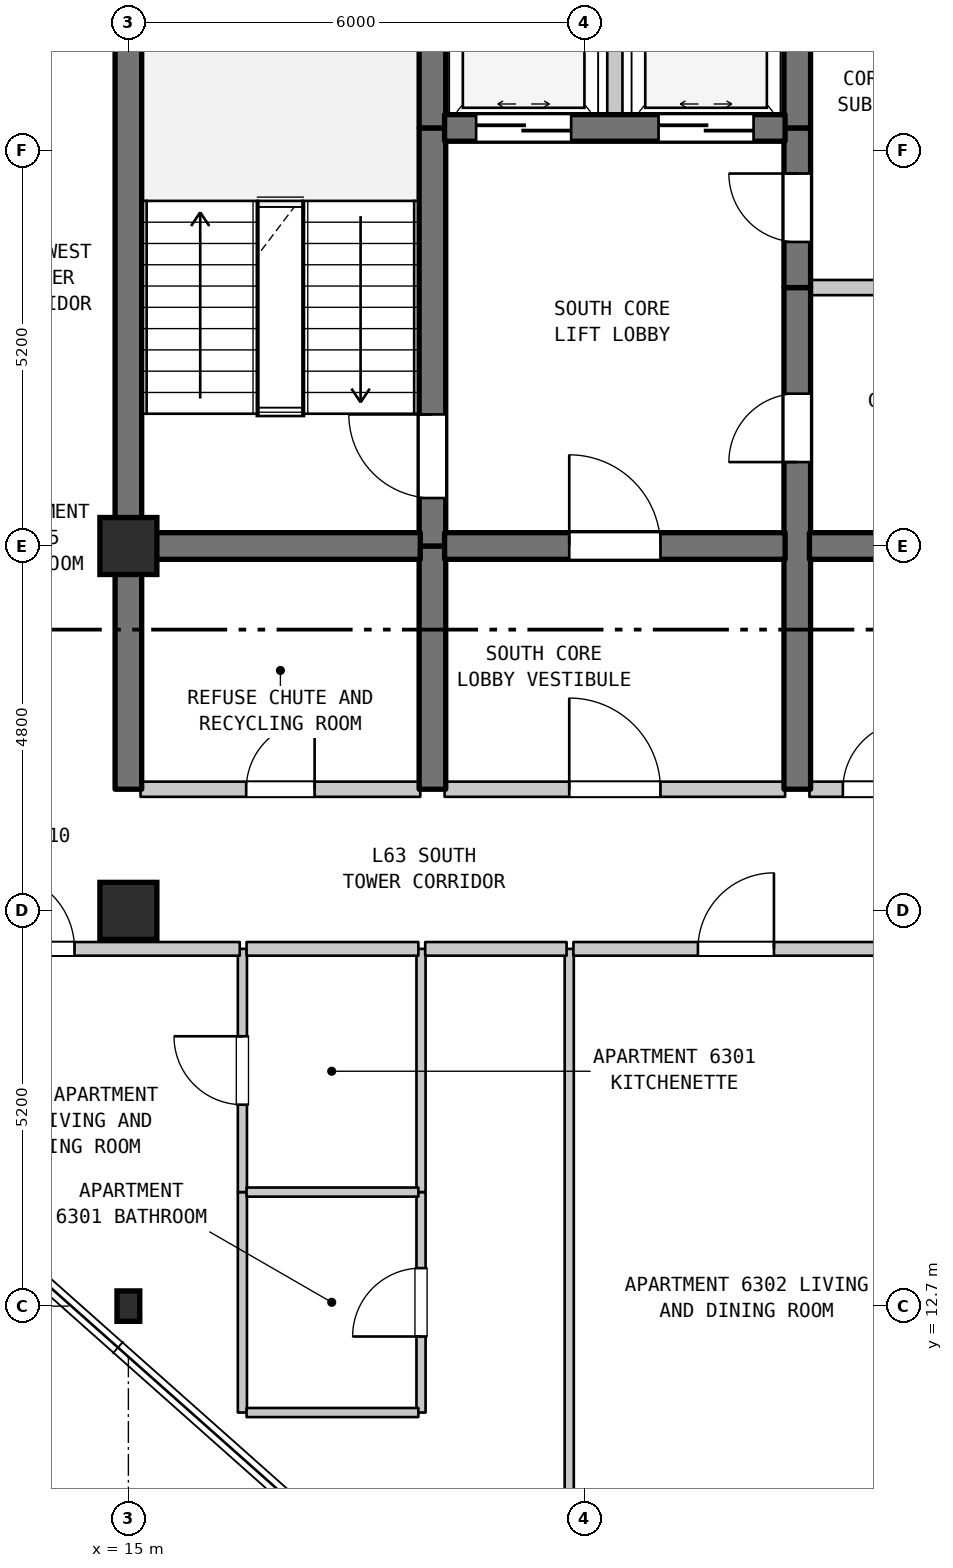
"""IFC4 building model, lengths in metres.
Left out: names, types, materials, properties, quantities, classifications, styles, units other than length and angle.
Written with IfcOpenShell. Run it as: python <this file> out.ifc"""

import sys

from ifc_helpers import new_model, si_unit, direction, frame, frame_2d, origin, origin_2d, place, context, subcontext, project, spatial, rectangle, i_section, extrude, element, fill, save


model = new_model("IFC4")
c1 = context("Model", 3, precision=1e-05, world=origin(), true_north=direction((0.0, 1.0)))
c2 = subcontext(c1, "Body", "Model", "MODEL_VIEW")
j1 = project(units=[si_unit("LENGTHUNIT", "METRE"), si_unit("PLANEANGLEUNIT", "RADIAN")], contexts=[c1])
p1 = place(None, origin())
s1 = spatial("IfcSite", under=j1, at=p1, CompositionType="ELEMENT")
p2 = place(p1, origin())
s2 = spatial("IfcBuilding", under=s1, at=p2, CompositionType="ELEMENT")
p3 = place(p2, frame((0.0, 0.0, 254.7)))
s3 = spatial("IfcBuildingStorey", under=s2, at=p3, CompositionType="ELEMENT", Elevation=254.7)
p4 = place(p3, frame((15.0, 12.7, 0.0), z_axis=(0.0, 0.0, 1.0), x_axis=(1.0, 0.0, 0.0)))
e1 = element("IfcColumn", 1, at=p4, inside=s3, PredefinedType="COLUMN", context=c2, shape_type="SweptSolid", body=[
    extrude(i_section(OverallWidth=0.3, OverallDepth=0.4, WebThickness=0.013, FlangeThickness=0.024, FilletRadius=0.027, at=origin_2d()), origin(), (0.0, 0.0, 1.0), 3.7),
])
for number, where, z_axis, x_axis in (
    (2, (15.0, 17.9, 0.0), (0.0, 0.0, 1.0), (1.0, 0.0, 0.0)),
    (3, (15.0, 22.7, 0.0), (0.0, 0.0, 1.0), (1.0, 0.0, 0.0)),
):
    element("IfcColumn", number, at=place(p3, frame(where, z_axis=z_axis, x_axis=x_axis)), inside=s3, PredefinedType="COLUMN", context=c2, shape_type="SweptSolid", body=[
        extrude(rectangle(XDim=0.75, YDim=0.75, at=origin_2d()), origin(), (0.0, 0.0, 1.0), 3.7),
    ])
p5 = place(p3, frame((15.0, 19.5, 0.0), z_axis=(0.0, 0.0, 1.0), x_axis=(0.0, 1.0, 0.0)))
e4 = element("IfcWall", 4, at=p5, inside=s3, PredefinedType="SHEAR", context=c2, shape_type="SweptSolid", body=[
    extrude(rectangle(XDim=3.2, YDim=0.35, at=frame_2d((1.6, 0.0))), origin(), (0.0, 0.0, 1.0), 3.39),
])
p6 = place(p3, frame((15.0, 22.7, 0.0), z_axis=(0.0, 0.0, 1.0), x_axis=(0.0, 1.0, 0.0)))
e5 = element("IfcWall", 5, at=p6, inside=s3, PredefinedType="SHEAR", context=c2, shape_type="SweptSolid", body=[
    extrude(rectangle(XDim=6.8, YDim=0.35, at=frame_2d((3.4, 0.0))), origin(), (0.0, 0.0, 1.0), 3.39),
])
p7 = place(p3, frame((16.5, 11.3, 0.0), z_axis=(0.0, 0.0, 1.0), x_axis=(0.0, 1.0, 0.0)))
e6 = element("IfcWall", 6, at=p7, inside=s3, PredefinedType="PARTITIONING", context=c2, shape_type="SweptSolid", body=[
    extrude(rectangle(XDim=2.9, YDim=0.12, at=frame_2d((1.45, 0.0))), origin(), (0.0, 0.0, 1.0), 3.39),
])
p8 = place(p3, frame((16.5, 14.2, 0.0), z_axis=(0.0, 0.0, 1.0), x_axis=(0.0, 1.0, 0.0)))
e7 = element("IfcWall", 7, at=p8, inside=s3, PredefinedType="PARTITIONING", context=c2, shape_type="SweptSolid", body=[
    extrude(rectangle(XDim=3.2, YDim=0.12, at=frame_2d((1.6, 0.0))), origin(), (0.0, 0.0, 1.0), 3.39),
])
p9 = place(p8, frame((1.15, 0.0, 0.0)))
e8 = element("IfcOpeningElement", 8, at=p9, cuts=e7, PredefinedType="OPENING", context=c2, shape_type="SweptSolid", body=[
    extrude(rectangle(XDim=0.9, YDim=2.15, at=frame_2d((0.45, 1.075))), frame((0.0, 0.07, 0.0), z_axis=(0.0, -1.0, 0.0), x_axis=(1.0, 0.0, 0.0)), (0.0, 0.0, 1.0), 0.14),
])
p10 = place(p3, frame((18.85, 11.3, 0.0), z_axis=(0.0, 0.0, 1.0), x_axis=(0.0, 1.0, 0.0)))
e9 = element("IfcWall", 9, at=p10, inside=s3, PredefinedType="PARTITIONING", context=c2, shape_type="SweptSolid", body=[
    extrude(rectangle(XDim=2.9, YDim=0.12, at=frame_2d((1.45, 0.0))), origin(), (0.0, 0.0, 1.0), 3.39),
])
p11 = place(p10, frame((1.0, 0.0, 0.0)))
e10 = element("IfcOpeningElement", 10, at=p11, cuts=e9, PredefinedType="OPENING", context=c2, shape_type="SweptSolid", body=[
    extrude(rectangle(XDim=0.9, YDim=2.1, at=frame_2d((0.45, 1.05))), frame((0.0, 0.07, 0.0), z_axis=(0.0, -1.0, 0.0), x_axis=(1.0, 0.0, 0.0)), (0.0, 0.0, 1.0), 0.14),
])
p12 = place(p3, frame((18.85, 14.2, 0.0), z_axis=(0.0, 0.0, 1.0), x_axis=(0.0, 1.0, 0.0)))
e11 = element("IfcWall", 11, at=p12, inside=s3, PredefinedType="PARTITIONING", context=c2, shape_type="SweptSolid", body=[
    extrude(rectangle(XDim=3.2, YDim=0.12, at=frame_2d((1.6, 0.0))), origin(), (0.0, 0.0, 1.0), 3.39),
])
p13 = place(p3, frame((19.0, 19.5, 0.0), z_axis=(0.0, 0.0, 1.0), x_axis=(0.0, 1.0, 0.0)))
e12 = element("IfcWall", 12, at=p13, inside=s3, PredefinedType="SHEAR", context=c2, shape_type="SweptSolid", body=[
    extrude(rectangle(XDim=3.2, YDim=0.35, at=frame_2d((1.6, 0.0))), origin(), (0.0, 0.0, 1.0), 3.39),
])
p14 = place(p3, frame((19.0, 22.7, 0.0), z_axis=(0.0, 0.0, 1.0), x_axis=(0.0, 1.0, 0.0)))
e13 = element("IfcWall", 13, at=p14, inside=s3, PredefinedType="SHEAR", context=c2, shape_type="SweptSolid", body=[
    extrude(rectangle(XDim=5.5, YDim=0.35, at=frame_2d((2.75, 0.0))), origin(), (0.0, 0.0, 1.0), 3.39),
])
p15 = place(p14, frame((0.631, 0.0, 0.0)))
e14 = element("IfcOpeningElement", 14, at=p15, cuts=e13, PredefinedType="OPENING", context=c2, shape_type="SweptSolid", body=[
    extrude(rectangle(XDim=1.1, YDim=2.15, at=frame_2d((0.55, 1.075))), frame((0.0, 0.185, 0.0), z_axis=(0.0, -1.0, 0.0), x_axis=(1.0, 0.0, 0.0)), (0.0, 0.0, 1.0), 0.37),
])
p16 = place(p3, frame((19.0, 28.2, 0.0), z_axis=(0.0, 0.0, 1.0), x_axis=(0.0, 1.0, 0.0)))
e15 = element("IfcWall", 15, at=p16, inside=s3, PredefinedType="SHEAR", context=c2, shape_type="SweptSolid", body=[
    extrude(rectangle(XDim=1.3, YDim=0.35, at=frame_2d((0.65, 0.0))), origin(), (0.0, 0.0, 1.0), 3.39),
])
p17 = place(p3, frame((20.8, 7.075, 0.0), z_axis=(0.0, 0.0, 1.0), x_axis=(0.0, 1.0, 0.0)))
e16 = element("IfcWall", 16, at=p17, inside=s3, PredefinedType="PARTITIONING", context=c2, shape_type="SweptSolid", body=[
    extrude(rectangle(XDim=10.325, YDim=0.12, at=frame_2d((5.163, 0.0))), origin(), (0.0, 0.0, 1.0), 3.39),
])
p18 = place(p3, frame((21.4, 28.2, 0.0), z_axis=(0.0, 0.0, 1.0), x_axis=(0.0, 1.0, 0.0)))
e17 = element("IfcWall", 17, at=p18, inside=s3, PredefinedType="STANDARD", context=c2, shape_type="SweptSolid", body=[
    extrude(rectangle(XDim=2.6, YDim=0.2, at=frame_2d((1.3, 0.0))), origin(), (0.0, 0.0, 1.0), 3.39),
])
p19 = place(p3, frame((23.8, 19.5, 0.0), z_axis=(0.0, 0.0, 1.0), x_axis=(0.0, 1.0, 0.0)))
e18 = element("IfcWall", 18, at=p19, inside=s3, PredefinedType="SHEAR", context=c2, shape_type="SweptSolid", body=[
    extrude(rectangle(XDim=6.6, YDim=0.35, at=frame_2d((3.3, 0.0))), origin(), (0.0, 0.0, 1.0), 3.39),
])
p20 = place(p19, frame((4.304, 0.0, 0.0)))
e19 = element("IfcOpeningElement", 19, at=p20, cuts=e18, PredefinedType="OPENING", context=c2, shape_type="SweptSolid", body=[
    extrude(rectangle(XDim=0.9, YDim=2.15, at=frame_2d((0.45, 1.075))), frame((0.0, 0.185, 0.0), z_axis=(0.0, -1.0, 0.0), x_axis=(1.0, 0.0, 0.0)), (0.0, 0.0, 1.0), 0.37),
])
p21 = place(p3, frame((23.8, 26.1, 0.0), z_axis=(0.0, 0.0, 1.0), x_axis=(0.0, 1.0, 0.0)))
e20 = element("IfcWall", 20, at=p21, inside=s3, PredefinedType="SHEAR", context=c2, shape_type="SweptSolid", body=[
    extrude(rectangle(XDim=2.1, YDim=0.35, at=frame_2d((1.05, 0.0))), origin(), (0.0, 0.0, 1.0), 3.39),
])
p22 = place(p21, frame((0.6, 0.0, 0.0)))
e21 = element("IfcOpeningElement", 21, at=p22, cuts=e20, PredefinedType="OPENING", context=c2, shape_type="SweptSolid", body=[
    extrude(rectangle(XDim=0.9, YDim=2.15, at=frame_2d((0.45, 1.075))), frame((0.0, 0.185, 0.0), z_axis=(0.0, -1.0, 0.0), x_axis=(1.0, 0.0, 0.0)), (0.0, 0.0, 1.0), 0.37),
])
p23 = place(p3, frame((23.8, 28.2, 0.0), z_axis=(0.0, 0.0, 1.0), x_axis=(0.0, 1.0, 0.0)))
e22 = element("IfcWall", 22, at=p23, inside=s3, PredefinedType="SHEAR", context=c2, shape_type="SweptSolid", body=[
    extrude(rectangle(XDim=2.6, YDim=0.35, at=frame_2d((1.3, 0.0))), origin(), (0.0, 0.0, 1.0), 3.39),
])
for number, where, z_axis, x_axis in (
    (23, (16.555, 11.3, 0.0), (0.0, 0.0, 1.0), (1.0, 0.0, 0.0)),
    (24, (16.555, 14.2, 0.0), (0.0, 0.0, 1.0), (1.0, 0.0, 0.0)),
):
    element("IfcWall", number, at=place(p3, frame(where, z_axis=z_axis, x_axis=x_axis)), inside=s3, PredefinedType="PARTITIONING", context=c2, shape_type="SweptSolid", body=[
        extrude(rectangle(XDim=2.26, YDim=0.12, at=frame_2d((1.13, 0.0))), origin(), (0.0, 0.0, 1.0), 3.39),
    ])
p24 = place(p3, frame((12.975, 17.4, 0.0), z_axis=(0.0, 0.0, 1.0), x_axis=(1.0, 0.0, 0.0)))
e25 = element("IfcWall", 25, at=p24, inside=s3, PredefinedType="STANDARD", context=c2, shape_type="SweptSolid", body=[
    extrude(rectangle(XDim=3.49, YDim=0.18, at=frame_2d((1.745, 0.0))), origin(), (0.0, 0.0, 1.0), 3.39),
])
p25 = place(p24, frame((0.316, 0.0, 0.0)))
e26 = element("IfcOpeningElement", 26, at=p25, cuts=e25, PredefinedType="OPENING", context=c2, shape_type="SweptSolid", body=[
    extrude(rectangle(XDim=1.0, YDim=2.15, at=frame_2d((0.5, 1.075))), frame((0.0, 0.1, 0.0), z_axis=(0.0, -1.0, 0.0), x_axis=(1.0, 0.0, 0.0)), (0.0, 0.0, 1.0), 0.2),
])
p26 = place(p3, frame((16.555, 17.4, 0.0), z_axis=(0.0, 0.0, 1.0), x_axis=(1.0, 0.0, 0.0)))
e27 = element("IfcWall", 27, at=p26, inside=s3, PredefinedType="STANDARD", context=c2, shape_type="SweptSolid", body=[
    extrude(rectangle(XDim=2.26, YDim=0.18, at=frame_2d((1.13, 0.0))), origin(), (0.0, 0.0, 1.0), 3.39),
])
p27 = place(p3, frame((18.905, 17.4, 0.0), z_axis=(0.0, 0.0, 1.0), x_axis=(1.0, 0.0, 0.0)))
e28 = element("IfcWall", 28, at=p27, inside=s3, PredefinedType="STANDARD", context=c2, shape_type="SweptSolid", body=[
    extrude(rectangle(XDim=1.86, YDim=0.18, at=frame_2d((0.93, 0.0))), origin(), (0.0, 0.0, 1.0), 3.39),
])
p28 = place(p3, frame((20.855, 17.4, 0.0), z_axis=(0.0, 0.0, 1.0), x_axis=(1.0, 0.0, 0.0)))
e29 = element("IfcWall", 29, at=p28, inside=s3, PredefinedType="STANDARD", context=c2, shape_type="SweptSolid", body=[
    extrude(rectangle(XDim=4.42, YDim=0.18, at=frame_2d((2.21, 0.0))), origin(), (0.0, 0.0, 1.0), 3.39),
])
p29 = place(p28, frame((1.638, 0.0, 0.0)))
e30 = element("IfcOpeningElement", 30, at=p29, cuts=e29, PredefinedType="OPENING", context=c2, shape_type="SweptSolid", body=[
    extrude(rectangle(XDim=1.0, YDim=2.15, at=frame_2d((0.5, 1.075))), frame((0.0, 0.1, 0.0), z_axis=(0.0, -1.0, 0.0), x_axis=(1.0, 0.0, 0.0)), (0.0, 0.0, 1.0), 0.2),
])
p30 = place(p3, frame((15.16, 19.5, 0.0), z_axis=(0.0, 0.0, 1.0), x_axis=(1.0, 0.0, 0.0)))
e31 = element("IfcWall", 31, at=p30, inside=s3, PredefinedType="STANDARD", context=c2, shape_type="SweptSolid", body=[
    extrude(rectangle(XDim=3.68, YDim=0.2, at=frame_2d((1.84, 0.0))), origin(), (0.0, 0.0, 1.0), 3.39),
])
p31 = place(p30, frame((1.39, 0.0, 0.0)))
e32 = element("IfcOpeningElement", 32, at=p31, cuts=e31, PredefinedType="OPENING", context=c2, shape_type="SweptSolid", body=[
    extrude(rectangle(XDim=0.9, YDim=2.15, at=frame_2d((0.45, 1.075))), frame((0.0, 0.11, 0.0), z_axis=(0.0, -1.0, 0.0), x_axis=(1.0, 0.0, 0.0)), (0.0, 0.0, 1.0), 0.22),
])
p32 = place(p3, frame((19.16, 19.5, 0.0), z_axis=(0.0, 0.0, 1.0), x_axis=(1.0, 0.0, 0.0)))
e33 = element("IfcWall", 33, at=p32, inside=s3, PredefinedType="STANDARD", context=c2, shape_type="SweptSolid", body=[
    extrude(rectangle(XDim=4.48, YDim=0.2, at=frame_2d((2.24, 0.0))), origin(), (0.0, 0.0, 1.0), 3.39),
])
p33 = place(p32, frame((1.64, 0.0, 0.0)))
e34 = element("IfcOpeningElement", 34, at=p33, cuts=e33, PredefinedType="OPENING", context=c2, shape_type="SweptSolid", body=[
    extrude(rectangle(XDim=1.2, YDim=2.2, at=frame_2d((0.6, 1.1))), frame((0.0, 0.11, 0.0), z_axis=(0.0, -1.0, 0.0), x_axis=(1.0, 0.0, 0.0)), (0.0, 0.0, 1.0), 0.22),
])
p34 = place(p3, frame((23.96, 19.5, 0.0), z_axis=(0.0, 0.0, 1.0), x_axis=(1.0, 0.0, 0.0)))
e35 = element("IfcWall", 35, at=p34, inside=s3, PredefinedType="STANDARD", context=c2, shape_type="SweptSolid", body=[
    extrude(rectangle(XDim=1.855, YDim=0.2, at=frame_2d((0.927, 0.0))), origin(), (0.0, 0.0, 1.0), 3.39),
])
p35 = place(p34, frame((0.44, 0.0, 0.0)))
e36 = element("IfcOpeningElement", 36, at=p35, cuts=e35, PredefinedType="OPENING", context=c2, shape_type="SweptSolid", body=[
    extrude(rectangle(XDim=0.9, YDim=2.15, at=frame_2d((0.45, 1.075))), frame((0.0, 0.11, 0.0), z_axis=(0.0, -1.0, 0.0), x_axis=(1.0, 0.0, 0.0)), (0.0, 0.0, 1.0), 0.22),
])
p36 = place(p3, frame((15.16, 22.7, 0.0), z_axis=(0.0, 0.0, 1.0), x_axis=(1.0, 0.0, 0.0)))
e37 = element("IfcWall", 37, at=p36, inside=s3, PredefinedType="SHEAR", context=c2, shape_type="SweptSolid", body=[
    extrude(rectangle(XDim=3.68, YDim=0.35, at=frame_2d((1.84, 0.0))), origin(), (0.0, 0.0, 1.0), 3.39),
])
p37 = place(p3, frame((19.16, 22.7, 0.0), z_axis=(0.0, 0.0, 1.0), x_axis=(1.0, 0.0, 0.0)))
e38 = element("IfcWall", 38, at=p37, inside=s3, PredefinedType="SHEAR", context=c2, shape_type="SweptSolid", body=[
    extrude(rectangle(XDim=4.48, YDim=0.35, at=frame_2d((2.24, 0.0))), origin(), (0.0, 0.0, 1.0), 3.39),
])
p38 = place(p37, frame((1.64, 0.0, 0.0)))
e39 = element("IfcOpeningElement", 39, at=p38, cuts=e38, PredefinedType="OPENING", context=c2, shape_type="SweptSolid", body=[
    extrude(rectangle(XDim=1.2, YDim=2.2, at=frame_2d((0.6, 1.1))), frame((0.0, 0.185, 0.0), z_axis=(0.0, -1.0, 0.0), x_axis=(1.0, 0.0, 0.0)), (0.0, 0.0, 1.0), 0.37),
])
p39 = place(p3, frame((23.96, 22.7, 0.0), z_axis=(0.0, 0.0, 1.0), x_axis=(1.0, 0.0, 0.0)))
e40 = element("IfcWall", 40, at=p39, inside=s3, PredefinedType="SHEAR", context=c2, shape_type="SweptSolid", body=[
    extrude(rectangle(XDim=1.855, YDim=0.35, at=frame_2d((0.927, 0.0))), origin(), (0.0, 0.0, 1.0), 3.39),
])
p40 = place(p3, frame((23.96, 26.1, 0.0), z_axis=(0.0, 0.0, 1.0), x_axis=(1.0, 0.0, 0.0)))
e41 = element("IfcWall", 41, at=p40, inside=s3, PredefinedType="STANDARD", context=c2, shape_type="SweptSolid", body=[
    extrude(rectangle(XDim=3.18, YDim=0.2, at=frame_2d((1.59, 0.0))), origin(), (0.0, 0.0, 1.0), 3.39),
])
p41 = place(p3, frame((19.16, 28.2, 0.0), z_axis=(0.0, 0.0, 1.0), x_axis=(1.0, 0.0, 0.0)))
e42 = element("IfcWall", 42, at=p41, inside=s3, PredefinedType="SHEAR", context=c2, shape_type="SweptSolid", body=[
    extrude(rectangle(XDim=4.48, YDim=0.35, at=frame_2d((2.24, 0.0))), origin(), (0.0, 0.0, 1.0), 3.39),
])
p42 = place(p41, frame((0.415, 0.0, 0.0)))
e43 = element("IfcOpeningElement", 43, at=p42, cuts=e42, PredefinedType="OPENING", context=c2, shape_type="SweptSolid", body=[
    extrude(rectangle(XDim=1.25, YDim=2.2, at=frame_2d((0.625, 1.1))), frame((0.0, 0.185, 0.0), z_axis=(0.0, -1.0, 0.0), x_axis=(1.0, 0.0, 0.0)), (0.0, 0.0, 1.0), 0.37),
])
p43 = place(p41, frame((2.815, 0.0, 0.0)))
e44 = element("IfcOpeningElement", 44, at=p43, cuts=e42, PredefinedType="OPENING", context=c2, shape_type="SweptSolid", body=[
    extrude(rectangle(XDim=1.25, YDim=2.2, at=frame_2d((0.625, 1.1))), frame((0.0, 0.185, 0.0), z_axis=(0.0, -1.0, 0.0), x_axis=(1.0, 0.0, 0.0)), (0.0, 0.0, 1.0), 0.37),
])
p44 = place(p9, origin())
e45 = element("IfcDoor", 45, at=p44, inside=s3, OperationType="SINGLE_SWING_RIGHT", PredefinedType="DOOR", context=c2, shape_type="SweptSolid", body=[
    extrude(rectangle(XDim=0.9, YDim=2.15, at=frame_2d((0.45, 1.075))), frame((0.0, 0.025, 0.0), z_axis=(0.0, -1.0, 0.0), x_axis=(1.0, 0.0, 0.0)), (0.0, 0.0, 1.0), 0.05),
])
fill(e8, e45)
p45 = place(p11, origin())
e46 = element("IfcDoor", 46, at=p45, inside=s3, OperationType="SINGLE_SWING_LEFT", PredefinedType="DOOR", context=c2, shape_type="SweptSolid", body=[
    extrude(rectangle(XDim=0.9, YDim=2.1, at=frame_2d((0.45, 1.05))), frame((0.0, 0.025, 0.0), z_axis=(0.0, -1.0, 0.0), x_axis=(1.0, 0.0, 0.0)), (0.0, 0.0, 1.0), 0.05),
])
fill(e10, e46)
p46 = place(p15, origin())
e47 = element("IfcDoor", 47, at=p46, inside=s3, OperationType="SINGLE_SWING_RIGHT", PredefinedType="DOOR", context=c2, shape_type="SweptSolid", body=[
    extrude(rectangle(XDim=1.1, YDim=2.15, at=frame_2d((0.55, 1.075))), frame((0.0, 0.025, 0.0), z_axis=(0.0, -1.0, 0.0), x_axis=(1.0, 0.0, 0.0)), (0.0, 0.0, 1.0), 0.05),
])
fill(e14, e47)
p47 = place(p20, origin())
e48 = element("IfcDoor", 48, at=p47, inside=s3, OperationType="SINGLE_SWING_LEFT", PredefinedType="DOOR", context=c2, shape_type="SweptSolid", body=[
    extrude(rectangle(XDim=0.9, YDim=2.15, at=frame_2d((0.45, 1.075))), frame((0.0, 0.025, 0.0), z_axis=(0.0, -1.0, 0.0), x_axis=(1.0, 0.0, 0.0)), (0.0, 0.0, 1.0), 0.05),
])
fill(e19, e48)
p48 = place(p22, origin())
e49 = element("IfcDoor", 49, at=p48, inside=s3, OperationType="SINGLE_SWING_RIGHT", PredefinedType="DOOR", context=c2, shape_type="SweptSolid", body=[
    extrude(rectangle(XDim=0.9, YDim=2.15, at=frame_2d((0.45, 1.075))), frame((0.0, 0.025, 0.0), z_axis=(0.0, -1.0, 0.0), x_axis=(1.0, 0.0, 0.0)), (0.0, 0.0, 1.0), 0.05),
])
fill(e21, e49)
p49 = place(p25, origin())
e50 = element("IfcDoor", 50, at=p49, inside=s3, OperationType="SINGLE_SWING_LEFT", PredefinedType="DOOR", context=c2, shape_type="SweptSolid", body=[
    extrude(rectangle(XDim=1.0, YDim=2.15, at=frame_2d((0.5, 1.075))), frame((0.0, 0.025, 0.0), z_axis=(0.0, -1.0, 0.0), x_axis=(1.0, 0.0, 0.0)), (0.0, 0.0, 1.0), 0.05),
])
fill(e26, e50)
p50 = place(p29, origin())
e51 = element("IfcDoor", 51, at=p50, inside=s3, OperationType="SINGLE_SWING_RIGHT", PredefinedType="DOOR", context=c2, shape_type="SweptSolid", body=[
    extrude(rectangle(XDim=1.0, YDim=2.15, at=frame_2d((0.5, 1.075))), frame((0.0, 0.025, 0.0), z_axis=(0.0, -1.0, 0.0), x_axis=(1.0, 0.0, 0.0)), (0.0, 0.0, 1.0), 0.05),
])
fill(e30, e51)
p51 = place(p31, origin())
e52 = element("IfcDoor", 52, at=p51, inside=s3, OperationType="SINGLE_SWING_RIGHT", PredefinedType="DOOR", context=c2, shape_type="SweptSolid", body=[
    extrude(rectangle(XDim=0.9, YDim=2.15, at=frame_2d((0.45, 1.075))), frame((0.0, 0.025, 0.0), z_axis=(0.0, -1.0, 0.0), x_axis=(1.0, 0.0, 0.0)), (0.0, 0.0, 1.0), 0.05),
])
fill(e32, e52)
p52 = place(p33, origin())
e53 = element("IfcDoor", 53, at=p52, inside=s3, OperationType="SINGLE_SWING_LEFT", PredefinedType="DOOR", context=c2, shape_type="SweptSolid", body=[
    extrude(rectangle(XDim=1.2, YDim=2.2, at=frame_2d((0.6, 1.1))), frame((0.0, 0.025, 0.0), z_axis=(0.0, -1.0, 0.0), x_axis=(1.0, 0.0, 0.0)), (0.0, 0.0, 1.0), 0.05),
])
fill(e34, e53)
p53 = place(p35, origin())
e54 = element("IfcDoor", 54, at=p53, inside=s3, OperationType="SINGLE_SWING_RIGHT", PredefinedType="DOOR", context=c2, shape_type="SweptSolid", body=[
    extrude(rectangle(XDim=0.9, YDim=2.15, at=frame_2d((0.45, 1.075))), frame((0.0, 0.025, 0.0), z_axis=(0.0, -1.0, 0.0), x_axis=(1.0, 0.0, 0.0)), (0.0, 0.0, 1.0), 0.05),
])
fill(e36, e54)
p54 = place(p38, origin())
e55 = element("IfcDoor", 55, at=p54, inside=s3, OperationType="SINGLE_SWING_LEFT", PredefinedType="DOOR", context=c2, shape_type="SweptSolid", body=[
    extrude(rectangle(XDim=1.2, YDim=2.2, at=frame_2d((0.6, 1.1))), frame((0.0, 0.025, 0.0), z_axis=(0.0, -1.0, 0.0), x_axis=(1.0, 0.0, 0.0)), (0.0, 0.0, 1.0), 0.05),
])
fill(e39, e55)
p55 = place(p42, origin())
e56 = element("IfcDoor", 56, at=p55, inside=s3, OperationType="DOUBLE_DOOR_SLIDING", PredefinedType="DOOR", context=c2, shape_type="SweptSolid", body=[
    extrude(rectangle(XDim=1.25, YDim=2.2, at=frame_2d((0.625, 1.1))), frame((0.0, 0.025, 0.0), z_axis=(0.0, -1.0, 0.0), x_axis=(1.0, 0.0, 0.0)), (0.0, 0.0, 1.0), 0.05),
])
fill(e43, e56)
p56 = place(p43, origin())
e57 = element("IfcDoor", 57, at=p56, inside=s3, OperationType="DOUBLE_DOOR_SLIDING", PredefinedType="DOOR", context=c2, shape_type="SweptSolid", body=[
    extrude(rectangle(XDim=1.25, YDim=2.2, at=frame_2d((0.625, 1.1))), frame((0.0, 0.025, 0.0), z_axis=(0.0, -1.0, 0.0), x_axis=(1.0, 0.0, 0.0)), (0.0, 0.0, 1.0), 0.05),
])
fill(e44, e57)
save(model, sys.argv[1])
